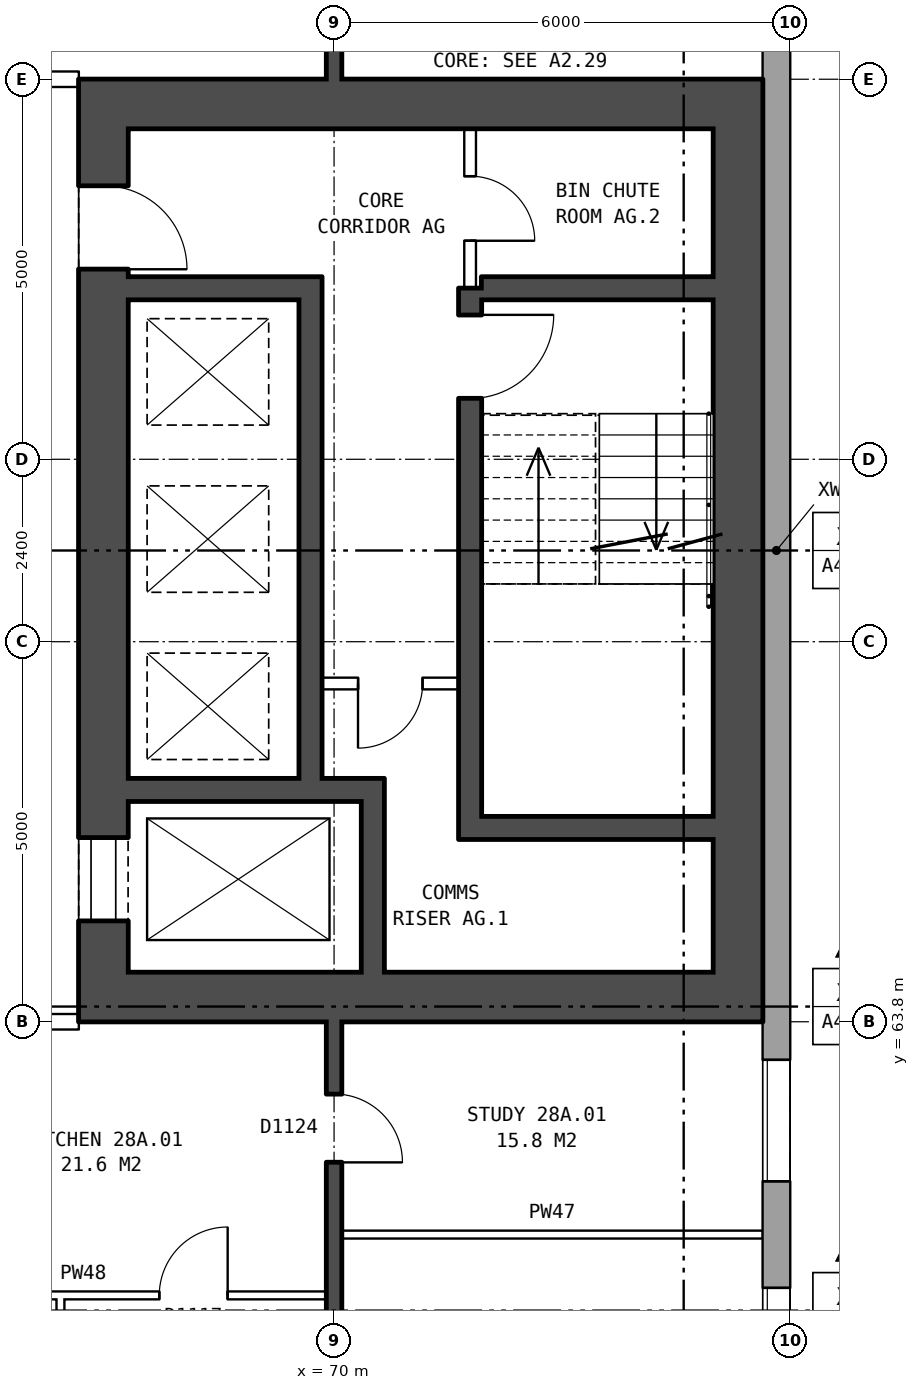
"""IFC4 building model, lengths in metres.
Left out: names, types, materials, properties, quantities, classifications, styles, units other than length and angle.
Written with IfcOpenShell. Run it as: python <this file> out.ifc"""

import sys

from ifc_helpers import new_model, si_unit, direction, frame, frame_2d, origin, place, context, subcontext, project, spatial, rectangle, extrude, element, fill, save


model = new_model("IFC4")
c1 = context("Model", 3, precision=1e-05, world=origin(), true_north=direction((0.0, 1.0)))
c2 = subcontext(c1, "Body", "Model", "MODEL_VIEW")
j1 = project(units=[si_unit("LENGTHUNIT", "METRE"), si_unit("PLANEANGLEUNIT", "RADIAN")], contexts=[c1])
p1 = place(None, origin())
s1 = spatial("IfcSite", under=j1, at=p1, CompositionType="ELEMENT")
p2 = place(p1, origin())
s2 = spatial("IfcBuilding", under=s1, at=p2, CompositionType="ELEMENT")
p3 = place(p2, frame((0.0, 0.0, 102.6)))
s3 = spatial("IfcBuildingStorey", under=s2, at=p3, CompositionType="ELEMENT", Elevation=102.6)
p4 = place(p3, frame((75.82, 57.075, 0.0), z_axis=(0.0, 0.0, 1.0), x_axis=(0.0, 1.0, 0.0)))
e1 = element("IfcWall", 1, at=p4, inside=s3, PredefinedType="STANDARD", context=c2, shape_type="SweptSolid", body=[
    extrude(rectangle(XDim=25.851, YDim=0.36, at=frame_2d((12.925, 0.0))), origin(), (0.0, 0.0, 1.0), 2.85),
])
p5 = place(p4, frame((1.625, 0.0, 0.8)))
e2 = element("IfcOpeningElement", 2, at=p5, cuts=e1, PredefinedType="OPENING", context=c2, shape_type="SweptSolid", body=[
    extrude(rectangle(XDim=1.6, YDim=1.8, at=frame_2d((0.8, 0.9))), frame((0.0, 0.19, 0.0), z_axis=(0.0, -1.0, 0.0), x_axis=(1.0, 0.0, 0.0)), (0.0, 0.0, 1.0), 0.38),
])
p6 = place(p4, frame((4.625, 0.0, 0.8)))
e3 = element("IfcOpeningElement", 3, at=p6, cuts=e1, PredefinedType="OPENING", context=c2, shape_type="SweptSolid", body=[
    extrude(rectangle(XDim=1.6, YDim=1.8, at=frame_2d((0.8, 0.9))), frame((0.0, 0.19, 0.0), z_axis=(0.0, -1.0, 0.0), x_axis=(1.0, 0.0, 0.0)), (0.0, 0.0, 1.0), 0.38),
])
p7 = place(p4, frame((19.625, 0.0, 0.8)))
e4 = element("IfcOpeningElement", 4, at=p7, cuts=e1, PredefinedType="OPENING", context=c2, shape_type="SweptSolid", body=[
    extrude(rectangle(XDim=1.6, YDim=1.8, at=frame_2d((0.8, 0.9))), frame((0.0, 0.19, 0.0), z_axis=(0.0, -1.0, 0.0), x_axis=(1.0, 0.0, 0.0)), (0.0, 0.0, 1.0), 0.38),
])
p8 = place(p4, frame((22.625, 0.0, 0.8)))
e5 = element("IfcOpeningElement", 5, at=p8, cuts=e1, PredefinedType="OPENING", context=c2, shape_type="SweptSolid", body=[
    extrude(rectangle(XDim=1.6, YDim=1.8, at=frame_2d((0.8, 0.9))), frame((0.0, 0.19, 0.0), z_axis=(0.0, -1.0, 0.0), x_axis=(1.0, 0.0, 0.0)), (0.0, 0.0, 1.0), 0.38),
])
p9 = place(p3, frame((66.965, 64.45, 0.0), z_axis=(0.0, 0.0, 1.0), x_axis=(0.0, 1.0, 0.0)))
e6 = element("IfcWall", 6, at=p9, inside=s3, PredefinedType="SHEAR", context=c2, shape_type="SweptSolid", body=[
    extrude(rectangle(XDim=11.1, YDim=0.65, at=frame_2d((5.55, 0.0))), origin(), (0.0, 0.0, 1.0), 2.85),
])
p10 = place(p9, frame((0.675, 0.0, 0.0)))
e7 = element("IfcOpeningElement", 7, at=p10, cuts=e6, PredefinedType="OPENING", context=c2, shape_type="SweptSolid", body=[
    extrude(rectangle(XDim=1.1, YDim=2.1, at=frame_2d((0.55, 1.05))), frame((0.0, 0.335, 0.0), z_axis=(0.0, -1.0, 0.0), x_axis=(1.0, 0.0, 0.0)), (0.0, 0.0, 1.0), 0.67),
])
p11 = place(p9, frame((9.25, 0.0, 0.0)))
e8 = element("IfcOpeningElement", 8, at=p11, cuts=e6, PredefinedType="OPENING", context=c2, shape_type="SweptSolid", body=[
    extrude(rectangle(XDim=1.1, YDim=2.1, at=frame_2d((0.55, 1.05))), frame((0.0, 0.335, 0.0), z_axis=(0.0, -1.0, 0.0), x_axis=(1.0, 0.0, 0.0)), (0.0, 0.0, 1.0), 0.67),
])
p12 = place(p3, frame((75.315, 64.45, 0.0), z_axis=(0.0, 0.0, 1.0), x_axis=(0.0, 1.0, 0.0)))
e9 = element("IfcWall", 9, at=p12, inside=s3, PredefinedType="SHEAR", context=c2, shape_type="SweptSolid", body=[
    extrude(rectangle(XDim=11.1, YDim=0.65, at=frame_2d((5.55, 0.0))), origin(), (0.0, 0.0, 1.0), 2.85),
])
for number, where, z_axis, x_axis in (
    (10, (66.64, 64.125, 0.0), (0.0, 0.0, 1.0), (1.0, 0.0, 0.0)),
    (11, (66.64, 75.875, 0.0), (0.0, 0.0, 1.0), (1.0, 0.0, 0.0)),
):
    element("IfcWall", number, at=place(p3, frame(where, z_axis=z_axis, x_axis=x_axis)), inside=s3, PredefinedType="SHEAR", context=c2, shape_type="SweptSolid", body=[
        extrude(rectangle(XDim=9.0, YDim=0.65, at=frame_2d((4.5, 0.0))), origin(), (0.0, 0.0, 1.0), 2.85),
    ])
p13 = place(p3, frame((71.94, 66.35, 0.0), z_axis=(0.0, 0.0, 1.0), x_axis=(1.0, 0.0, 0.0)))
e12 = element("IfcWall", 12, at=p13, inside=s3, PredefinedType="SHEAR", context=c2, shape_type="SweptSolid", body=[
    extrude(rectangle(XDim=3.05, YDim=0.3, at=frame_2d((1.525, 0.0))), origin(), (0.0, 0.0, 1.0), 2.85),
])
p14 = place(p3, frame((67.29, 66.85, 0.0), z_axis=(0.0, 0.0, 1.0), x_axis=(1.0, 0.0, 0.0)))
e13 = element("IfcWall", 13, at=p14, inside=s3, PredefinedType="SHEAR", context=c2, shape_type="SweptSolid", body=[
    extrude(rectangle(XDim=3.37, YDim=0.3, at=frame_2d((1.685, 0.0))), origin(), (0.0, 0.0, 1.0), 2.85),
])
p15 = place(p3, frame((69.84, 68.25, 0.0), z_axis=(0.0, 0.0, 1.0), x_axis=(1.0, 0.0, 0.0)))
e14 = element("IfcWall", 14, at=p15, inside=s3, PredefinedType="PARTITIONING", context=c2, shape_type="SweptSolid", body=[
    extrude(rectangle(XDim=1.8, YDim=0.15, at=frame_2d((0.9, 0.0))), origin(), (0.0, 0.0, 1.0), 2.85),
])
p16 = place(p15, frame((0.475, 0.0, 0.0)))
e15 = element("IfcOpeningElement", 15, at=p16, cuts=e14, PredefinedType="OPENING", context=c2, shape_type="SweptSolid", body=[
    extrude(rectangle(XDim=0.85, YDim=2.1, at=frame_2d((0.425, 1.05))), frame((0.0, 0.085, 0.0), z_axis=(0.0, -1.0, 0.0), x_axis=(1.0, 0.0, 0.0)), (0.0, 0.0, 1.0), 0.17),
])
p17 = place(p3, frame((67.29, 73.45, 0.0), z_axis=(0.0, 0.0, 1.0), x_axis=(1.0, 0.0, 0.0)))
e16 = element("IfcWall", 16, at=p17, inside=s3, PredefinedType="SHEAR", context=c2, shape_type="SweptSolid", body=[
    extrude(rectangle(XDim=2.25, YDim=0.3, at=frame_2d((1.125, 0.0))), origin(), (0.0, 0.0, 1.0), 2.85),
])
p18 = place(p3, frame((71.94, 73.45, 0.0), z_axis=(0.0, 0.0, 1.0), x_axis=(1.0, 0.0, 0.0)))
e17 = element("IfcWall", 17, at=p18, inside=s3, PredefinedType="SHEAR", context=c2, shape_type="SweptSolid", body=[
    extrude(rectangle(XDim=3.05, YDim=0.3, at=frame_2d((1.525, 0.0))), origin(), (0.0, 0.0, 1.0), 2.85),
])
p19 = place(p3, frame((69.69, 67.0, 0.0), z_axis=(0.0, 0.0, 1.0), x_axis=(0.0, 1.0, 0.0)))
e18 = element("IfcWall", 18, at=p19, inside=s3, PredefinedType="SHEAR", context=c2, shape_type="SweptSolid", body=[
    extrude(rectangle(XDim=6.6, YDim=0.3, at=frame_2d((3.3, 0.0))), origin(), (0.0, 0.0, 1.0), 2.85),
])
p20 = place(p3, frame((70.51, 64.45, 0.0), z_axis=(0.0, 0.0, 1.0), x_axis=(0.0, 1.0, 0.0)))
e19 = element("IfcWall", 19, at=p20, inside=s3, PredefinedType="SHEAR", context=c2, shape_type="SweptSolid", body=[
    extrude(rectangle(XDim=2.25, YDim=0.3, at=frame_2d((1.125, 0.0))), origin(), (0.0, 0.0, 1.0), 2.85),
])
p21 = place(p3, frame((71.79, 66.2, 0.0), z_axis=(0.0, 0.0, 1.0), x_axis=(0.0, 1.0, 0.0)))
e20 = element("IfcWall", 20, at=p21, inside=s3, PredefinedType="SHEAR", context=c2, shape_type="SweptSolid", body=[
    extrude(rectangle(XDim=7.25, YDim=0.3, at=frame_2d((3.625, 0.0))), origin(), (0.0, 0.0, 1.0), 2.85),
])
p22 = place(p21, frame((5.8, 0.0, 0.0)))
e21 = element("IfcOpeningElement", 21, at=p22, cuts=e20, PredefinedType="OPENING", context=c2, shape_type="SweptSolid", body=[
    extrude(rectangle(XDim=1.1, YDim=2.1, at=frame_2d((0.55, 1.05))), frame((0.0, 0.16, 0.0), z_axis=(0.0, -1.0, 0.0), x_axis=(1.0, 0.0, 0.0)), (0.0, 0.0, 1.0), 0.32),
])
p23 = place(p3, frame((71.79, 73.45, 0.0), z_axis=(0.0, 0.0, 1.0), x_axis=(0.0, 1.0, 0.0)))
e22 = element("IfcWall", 22, at=p23, inside=s3, PredefinedType="PARTITIONING", context=c2, shape_type="SweptSolid", body=[
    extrude(rectangle(XDim=2.1, YDim=0.15, at=frame_2d((1.05, 0.0))), origin(), (0.0, 0.0, 1.0), 2.85),
])
p24 = place(p23, frame((0.625, 0.0, 0.0)))
e23 = element("IfcOpeningElement", 23, at=p24, cuts=e22, PredefinedType="OPENING", context=c2, shape_type="SweptSolid", body=[
    extrude(rectangle(XDim=0.85, YDim=2.1, at=frame_2d((0.425, 1.05))), frame((0.0, 0.085, 0.0), z_axis=(0.0, -1.0, 0.0), x_axis=(1.0, 0.0, 0.0)), (0.0, 0.0, 1.0), 0.17),
])
p25 = place(p3, frame((64.1, 60.2, 0.0), z_axis=(0.0, 0.0, 1.0), x_axis=(1.0, 0.0, 0.0)))
e24 = element("IfcWall", 24, at=p25, inside=s3, PredefinedType="PARTITIONING", context=c2, shape_type="SweptSolid", body=[
    extrude(rectangle(XDim=5.8, YDim=0.1, at=frame_2d((2.9, 0.0))), origin(), (0.0, 0.0, 1.0), 2.85),
])
p26 = place(p25, frame((3.6, 0.0, 0.0)))
e25 = element("IfcOpeningElement", 25, at=p26, cuts=e24, PredefinedType="OPENING", context=c2, shape_type="SweptSolid", body=[
    extrude(rectangle(XDim=0.9, YDim=2.1, at=frame_2d((0.45, 1.05))), frame((0.0, 0.06, 0.0), z_axis=(0.0, -1.0, 0.0), x_axis=(1.0, 0.0, 0.0)), (0.0, 0.0, 1.0), 0.12),
])
p27 = place(p25, frame((0.7, 0.0, 0.0)))
e26 = element("IfcOpeningElement", 26, at=p27, cuts=e24, PredefinedType="OPENING", context=c2, shape_type="SweptSolid", body=[
    extrude(rectangle(XDim=0.9, YDim=2.1, at=frame_2d((0.45, 1.05))), frame((0.0, 0.06, 0.0), z_axis=(0.0, -1.0, 0.0), x_axis=(1.0, 0.0, 0.0)), (0.0, 0.0, 1.0), 0.12),
])
p28 = place(p3, frame((70.1, 61.0, 0.0), z_axis=(0.0, 0.0, 1.0), x_axis=(1.0, 0.0, 0.0)))
e27 = element("IfcWall", 27, at=p28, inside=s3, PredefinedType="PARTITIONING", context=c2, shape_type="SweptSolid", body=[
    extrude(rectangle(XDim=5.54, YDim=0.1, at=frame_2d((2.77, 0.0))), origin(), (0.0, 0.0, 1.0), 2.85),
])
p29 = place(p3, frame((63.64, 63.8, 0.0), z_axis=(0.0, 0.0, 1.0), x_axis=(1.0, 0.0, 0.0)))
e28 = element("IfcWall", 28, at=p29, inside=s3, PredefinedType="PARTITIONING", context=c2, shape_type="SweptSolid", body=[
    extrude(rectangle(XDim=3.0, YDim=0.2, at=frame_2d((1.5, 0.0))), origin(), (0.0, 0.0, 1.0), 2.85),
])
p30 = place(p29, frame((1.18, 0.0, 0.0)))
e29 = element("IfcOpeningElement", 29, at=p30, cuts=e28, PredefinedType="OPENING", context=c2, shape_type="SweptSolid", body=[
    extrude(rectangle(XDim=1.0, YDim=2.1, at=frame_2d((0.5, 1.05))), frame((0.0, 0.11, 0.0), z_axis=(0.0, -1.0, 0.0), x_axis=(1.0, 0.0, 0.0)), (0.0, 0.0, 1.0), 0.22),
])
p31 = place(p3, frame((63.64, 76.2, 0.0), z_axis=(0.0, 0.0, 1.0), x_axis=(1.0, 0.0, 0.0)))
e30 = element("IfcWall", 30, at=p31, inside=s3, PredefinedType="PARTITIONING", context=c2, shape_type="SweptSolid", body=[
    extrude(rectangle(XDim=3.0, YDim=0.2, at=frame_2d((1.5, 0.0))), origin(), (0.0, 0.0, 1.0), 2.85),
])
p32 = place(p31, frame((1.18, 0.0, 0.0)))
e31 = element("IfcOpeningElement", 31, at=p32, cuts=e30, PredefinedType="OPENING", context=c2, shape_type="SweptSolid", body=[
    extrude(rectangle(XDim=1.0, YDim=2.1, at=frame_2d((0.5, 1.05))), frame((0.0, 0.11, 0.0), z_axis=(0.0, -1.0, 0.0), x_axis=(1.0, 0.0, 0.0)), (0.0, 0.0, 1.0), 0.22),
])
p33 = place(p3, frame((66.4, 57.85, 0.0), z_axis=(0.0, 0.0, 1.0), x_axis=(0.0, 1.0, 0.0)))
e32 = element("IfcWall", 32, at=p33, inside=s3, PredefinedType="PARTITIONING", context=c2, shape_type="SweptSolid", body=[
    extrude(rectangle(XDim=2.3, YDim=0.1, at=frame_2d((1.15, 0.0))), origin(), (0.0, 0.0, 1.0), 2.85),
])
p34 = place(p3, frame((70.0, 54.36, 0.0), z_axis=(0.0, 0.0, 1.0), x_axis=(0.0, 1.0, 0.0)))
e33 = element("IfcWall", 33, at=p34, inside=s3, PredefinedType="SOLIDWALL", context=c2, shape_type="SweptSolid", body=[
    extrude(rectangle(XDim=9.44, YDim=0.2, at=frame_2d((4.72, 0.0))), origin(), (0.0, 0.0, 1.0), 2.85),
])
p35 = place(p34, frame((2.47, 0.0, 0.0)))
e34 = element("IfcOpeningElement", 34, at=p35, cuts=e33, PredefinedType="OPENING", context=c2, shape_type="SweptSolid", body=[
    extrude(rectangle(XDim=0.9, YDim=2.1, at=frame_2d((0.45, 1.05))), frame((0.0, 0.11, 0.0), z_axis=(0.0, -1.0, 0.0), x_axis=(1.0, 0.0, 0.0)), (0.0, 0.0, 1.0), 0.22),
])
p36 = place(p34, frame((7.59, 0.0, 0.0)))
e35 = element("IfcOpeningElement", 35, at=p36, cuts=e33, PredefinedType="OPENING", context=c2, shape_type="SweptSolid", body=[
    extrude(rectangle(XDim=0.9, YDim=2.1, at=frame_2d((0.45, 1.05))), frame((0.0, 0.11, 0.0), z_axis=(0.0, -1.0, 0.0), x_axis=(1.0, 0.0, 0.0)), (0.0, 0.0, 1.0), 0.22),
])
p37 = place(p3, frame((70.0, 76.2, 0.0), z_axis=(0.0, 0.0, 1.0), x_axis=(0.0, 1.0, 0.0)))
e36 = element("IfcWall", 36, at=p37, inside=s3, PredefinedType="SOLIDWALL", context=c2, shape_type="SweptSolid", body=[
    extrude(rectangle(XDim=9.44, YDim=0.2, at=frame_2d((4.72, 0.0))), origin(), (0.0, 0.0, 1.0), 2.85),
])
p38 = place(p37, frame((1.5, 0.0, 0.0)))
e37 = element("IfcOpeningElement", 37, at=p38, cuts=e36, PredefinedType="OPENING", context=c2, shape_type="SweptSolid", body=[
    extrude(rectangle(XDim=0.9, YDim=2.1, at=frame_2d((0.45, 1.05))), frame((0.0, 0.11, 0.0), z_axis=(0.0, -1.0, 0.0), x_axis=(1.0, 0.0, 0.0)), (0.0, 0.0, 1.0), 0.22),
])
p39 = place(p5, origin())
e38 = element("IfcWindow", 38, at=p39, inside=s3, PartitioningType="SINGLE_PANEL", PredefinedType="WINDOW", context=c2, shape_type="SweptSolid", body=[
    extrude(rectangle(XDim=1.6, YDim=1.8, at=frame_2d((0.8, 0.9))), frame((0.0, 0.15, 0.0), z_axis=(0.0, -1.0, 0.0), x_axis=(1.0, 0.0, 0.0)), (0.0, 0.0, 1.0), 0.06),
])
fill(e2, e38)
p40 = place(p6, origin())
e39 = element("IfcWindow", 39, at=p40, inside=s3, PartitioningType="SINGLE_PANEL", PredefinedType="WINDOW", context=c2, shape_type="SweptSolid", body=[
    extrude(rectangle(XDim=1.6, YDim=1.8, at=frame_2d((0.8, 0.9))), frame((0.0, 0.15, 0.0), z_axis=(0.0, -1.0, 0.0), x_axis=(1.0, 0.0, 0.0)), (0.0, 0.0, 1.0), 0.06),
])
fill(e3, e39)
p41 = place(p10, origin())
e40 = element("IfcDoor", 40, at=p41, inside=s3, OperationType="DOUBLE_DOOR_SLIDING", PredefinedType="DOOR", context=c2, shape_type="SweptSolid", body=[
    extrude(rectangle(XDim=1.1, YDim=2.1, at=frame_2d((0.55, 1.05))), frame((0.0, -0.26, 0.0), z_axis=(0.0, -1.0, 0.0), x_axis=(1.0, 0.0, 0.0)), (0.0, 0.0, 1.0), 0.05),
])
fill(e7, e40)
p42 = place(p11, frame((1.1, 0.0, 0.0), z_axis=(0.0, 0.0, 1.0), x_axis=(-1.0, 0.0, 0.0)))
e41 = element("IfcDoor", 41, at=p42, inside=s3, OperationType="SINGLE_SWING_RIGHT", PredefinedType="DOOR", context=c2, shape_type="SweptSolid", body=[
    extrude(rectangle(XDim=1.1, YDim=2.1, at=frame_2d((0.55, 1.05))), frame((0.0, 0.31, 0.0), z_axis=(0.0, -1.0, 0.0), x_axis=(1.0, 0.0, 0.0)), (0.0, 0.0, 1.0), 0.05),
])
fill(e8, e41)
p43 = place(p22, frame((1.1, 0.0, 0.0), z_axis=(0.0, 0.0, 1.0), x_axis=(-1.0, 0.0, 0.0)))
e42 = element("IfcDoor", 42, at=p43, inside=s3, OperationType="SINGLE_SWING_LEFT", PredefinedType="DOOR", context=c2, shape_type="SweptSolid", body=[
    extrude(rectangle(XDim=1.1, YDim=2.1, at=frame_2d((0.55, 1.05))), frame((0.0, 0.025, 0.0), z_axis=(0.0, -1.0, 0.0), x_axis=(1.0, 0.0, 0.0)), (0.0, 0.0, 1.0), 0.05),
])
fill(e21, e42)
p44 = place(p16, frame((0.85, 0.0, 0.0), z_axis=(0.0, 0.0, 1.0), x_axis=(-1.0, 0.0, 0.0)))
e43 = element("IfcDoor", 43, at=p44, inside=s3, OperationType="SINGLE_SWING_RIGHT", PredefinedType="DOOR", context=c2, shape_type="SweptSolid", body=[
    extrude(rectangle(XDim=0.85, YDim=2.1, at=frame_2d((0.425, 1.05))), frame((0.0, 0.025, 0.0), z_axis=(0.0, -1.0, 0.0), x_axis=(1.0, 0.0, 0.0)), (0.0, 0.0, 1.0), 0.05),
])
fill(e15, e43)
p45 = place(p24, frame((0.85, 0.0, 0.0), z_axis=(0.0, 0.0, 1.0), x_axis=(-1.0, 0.0, 0.0)))
e44 = element("IfcDoor", 44, at=p45, inside=s3, OperationType="SINGLE_SWING_RIGHT", PredefinedType="DOOR", context=c2, shape_type="SweptSolid", body=[
    extrude(rectangle(XDim=0.85, YDim=2.1, at=frame_2d((0.425, 1.05))), frame((0.0, 0.025, 0.0), z_axis=(0.0, -1.0, 0.0), x_axis=(1.0, 0.0, 0.0)), (0.0, 0.0, 1.0), 0.05),
])
fill(e23, e44)
p46 = place(p36, frame((0.9, 0.0, 0.0), z_axis=(0.0, 0.0, 1.0), x_axis=(-1.0, 0.0, 0.0)))
e45 = element("IfcDoor", 45, at=p46, inside=s3, OperationType="SINGLE_SWING_RIGHT", PredefinedType="DOOR", context=c2, shape_type="SweptSolid", body=[
    extrude(rectangle(XDim=0.9, YDim=2.1, at=frame_2d((0.45, 1.05))), frame((0.0, 0.025, 0.0), z_axis=(0.0, -1.0, 0.0), x_axis=(1.0, 0.0, 0.0)), (0.0, 0.0, 1.0), 0.05),
])
fill(e35, e45)
p47 = place(p26, origin())
e46 = element("IfcDoor", 46, at=p47, inside=s3, OperationType="SINGLE_SWING_RIGHT", PredefinedType="DOOR", context=c2, shape_type="SweptSolid", body=[
    extrude(rectangle(XDim=0.9, YDim=2.1, at=frame_2d((0.45, 1.05))), frame((0.0, 0.025, 0.0), z_axis=(0.0, -1.0, 0.0), x_axis=(1.0, 0.0, 0.0)), (0.0, 0.0, 1.0), 0.05),
])
fill(e25, e46)
save(model, sys.argv[1])
